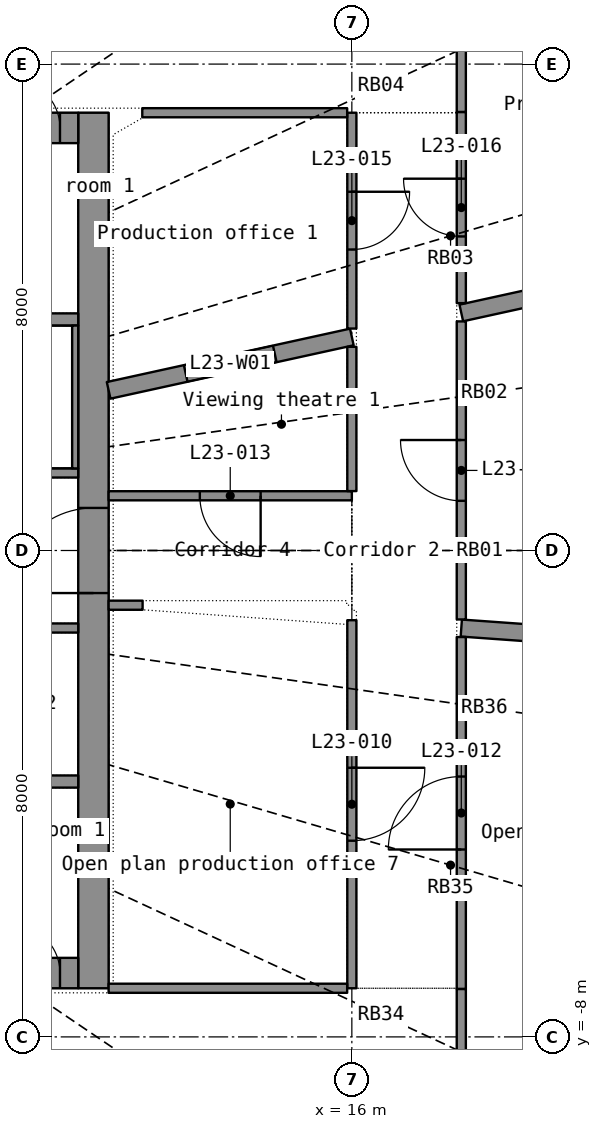
"""IFC4 building model, lengths in metres.
Left out: names, types, materials, properties, quantities, classifications, styles, units other than length and angle.
Written with IfcOpenShell. Run it as: python <this file> out.ifc"""

import sys

from ifc_helpers import new_model, si_unit, direction, frame, frame_2d, origin, place, context, subcontext, project, spatial, rectangle, extrude, element, fill, save


model = new_model("IFC4")
c1 = context("Model", 3, precision=1e-05, world=origin(), true_north=direction((0.0, 1.0)))
c2 = subcontext(c1, "Body", "Model", "MODEL_VIEW")
j1 = project(units=[si_unit("LENGTHUNIT", "METRE"), si_unit("PLANEANGLEUNIT", "RADIAN")], contexts=[c1])
p1 = place(None, origin())
s1 = spatial("IfcSite", under=j1, at=p1, CompositionType="ELEMENT")
p2 = place(p1, origin())
s2 = spatial("IfcBuilding", under=s1, at=p2, CompositionType="ELEMENT")
p3 = place(p2, frame((0.0, 0.0, 100.8)))
s3 = spatial("IfcBuildingStorey", under=s2, at=p3, CompositionType="ELEMENT", Elevation=100.8)
p4 = place(p3, frame((11.75, -7.2, 0.0), z_axis=(0.0, 0.0, 1.0), x_axis=(0.0, 1.0, 0.0)))
e1 = element("IfcWall", 1, at=p4, inside=s3, PredefinedType="SHEAR", context=c2, shape_type="SweptSolid", body=[
    extrude(rectangle(XDim=14.4, YDim=0.5, at=frame_2d((7.2, 0.0))), origin(), (0.0, 0.0, 1.0), 3.3),
])
p5 = place(p4, frame((6.5, 0.0, 0.0)))
e2 = element("IfcOpeningElement", 2, at=p5, cuts=e1, PredefinedType="OPENING", context=c2, shape_type="SweptSolid", body=[
    extrude(rectangle(XDim=1.4, YDim=2.2, at=frame_2d((0.7, 1.1))), frame((0.0, 0.26, 0.0), z_axis=(0.0, -1.0, 0.0), x_axis=(1.0, 0.0, 0.0)), (0.0, 0.0, 1.0), 0.52),
])
p6 = place(p3, frame((-11.5, -6.95, 0.0), z_axis=(0.0, 0.0, 1.0), x_axis=(1.0, 0.0, 0.0)))
e3 = element("IfcWall", 3, at=p6, inside=s3, PredefinedType="SHEAR", context=c2, shape_type="SweptSolid", body=[
    extrude(rectangle(XDim=23.0, YDim=0.5, at=frame_2d((11.5, 0.0))), origin(), (0.0, 0.0, 1.0), 3.3),
])
p7 = place(p6, frame((1.95, 0.0, 0.0)))
e4 = element("IfcOpeningElement", 4, at=p7, cuts=e3, PredefinedType="OPENING", context=c2, shape_type="SweptSolid", body=[
    extrude(rectangle(XDim=1.1, YDim=2.2, at=frame_2d((0.55, 1.1))), frame((0.0, 0.26, 0.0), z_axis=(0.0, -1.0, 0.0), x_axis=(1.0, 0.0, 0.0)), (0.0, 0.0, 1.0), 0.52),
])
p8 = place(p6, frame((3.95, 0.0, 0.0)))
e5 = element("IfcOpeningElement", 5, at=p8, cuts=e3, PredefinedType="OPENING", context=c2, shape_type="SweptSolid", body=[
    extrude(rectangle(XDim=1.1, YDim=2.2, at=frame_2d((0.55, 1.1))), frame((0.0, 0.26, 0.0), z_axis=(0.0, -1.0, 0.0), x_axis=(1.0, 0.0, 0.0)), (0.0, 0.0, 1.0), 0.52),
])
p9 = place(p6, frame((5.95, 0.0, 0.0)))
e6 = element("IfcOpeningElement", 6, at=p9, cuts=e3, PredefinedType="OPENING", context=c2, shape_type="SweptSolid", body=[
    extrude(rectangle(XDim=1.1, YDim=2.2, at=frame_2d((0.55, 1.1))), frame((0.0, 0.26, 0.0), z_axis=(0.0, -1.0, 0.0), x_axis=(1.0, 0.0, 0.0)), (0.0, 0.0, 1.0), 0.52),
])
p10 = place(p6, frame((7.95, 0.0, 0.0)))
e7 = element("IfcOpeningElement", 7, at=p10, cuts=e3, PredefinedType="OPENING", context=c2, shape_type="SweptSolid", body=[
    extrude(rectangle(XDim=1.1, YDim=2.2, at=frame_2d((0.55, 1.1))), frame((0.0, 0.26, 0.0), z_axis=(0.0, -1.0, 0.0), x_axis=(1.0, 0.0, 0.0)), (0.0, 0.0, 1.0), 0.52),
])
p11 = place(p6, frame((9.95, 0.0, 0.0)))
e8 = element("IfcOpeningElement", 8, at=p11, cuts=e3, PredefinedType="OPENING", context=c2, shape_type="SweptSolid", body=[
    extrude(rectangle(XDim=1.1, YDim=2.2, at=frame_2d((0.55, 1.1))), frame((0.0, 0.26, 0.0), z_axis=(0.0, -1.0, 0.0), x_axis=(1.0, 0.0, 0.0)), (0.0, 0.0, 1.0), 0.52),
])
p12 = place(p6, frame((11.95, 0.0, 0.0)))
e9 = element("IfcOpeningElement", 9, at=p12, cuts=e3, PredefinedType="OPENING", context=c2, shape_type="SweptSolid", body=[
    extrude(rectangle(XDim=1.1, YDim=2.2, at=frame_2d((0.55, 1.1))), frame((0.0, 0.26, 0.0), z_axis=(0.0, -1.0, 0.0), x_axis=(1.0, 0.0, 0.0)), (0.0, 0.0, 1.0), 0.52),
])
p13 = place(p6, frame((13.95, 0.0, 0.0)))
e10 = element("IfcOpeningElement", 10, at=p13, cuts=e3, PredefinedType="OPENING", context=c2, shape_type="SweptSolid", body=[
    extrude(rectangle(XDim=1.1, YDim=2.2, at=frame_2d((0.55, 1.1))), frame((0.0, 0.26, 0.0), z_axis=(0.0, -1.0, 0.0), x_axis=(1.0, 0.0, 0.0)), (0.0, 0.0, 1.0), 0.52),
])
p14 = place(p6, frame((15.95, 0.0, 0.0)))
e11 = element("IfcOpeningElement", 11, at=p14, cuts=e3, PredefinedType="OPENING", context=c2, shape_type="SweptSolid", body=[
    extrude(rectangle(XDim=1.1, YDim=2.2, at=frame_2d((0.55, 1.1))), frame((0.0, 0.26, 0.0), z_axis=(0.0, -1.0, 0.0), x_axis=(1.0, 0.0, 0.0)), (0.0, 0.0, 1.0), 0.52),
])
p15 = place(p6, frame((19.95, 0.0, 0.0)))
e12 = element("IfcOpeningElement", 12, at=p15, cuts=e3, PredefinedType="OPENING", context=c2, shape_type="SweptSolid", body=[
    extrude(rectangle(XDim=1.1, YDim=2.2, at=frame_2d((0.55, 1.1))), frame((0.0, 0.26, 0.0), z_axis=(0.0, -1.0, 0.0), x_axis=(1.0, 0.0, 0.0)), (0.0, 0.0, 1.0), 0.52),
])
p16 = place(p6, frame((0.3, 0.0, 0.0)))
e13 = element("IfcOpeningElement", 13, at=p16, cuts=e3, PredefinedType="OPENING", context=c2, shape_type="SweptSolid", body=[
    extrude(rectangle(XDim=0.8, YDim=2.05, at=frame_2d((0.4, 1.025))), frame((0.0, 0.26, 0.0), z_axis=(0.0, -1.0, 0.0), x_axis=(1.0, 0.0, 0.0)), (0.0, 0.0, 1.0), 0.52),
])
p17 = place(p6, frame((21.9, 0.0, 0.0)))
e14 = element("IfcOpeningElement", 14, at=p17, cuts=e3, PredefinedType="OPENING", context=c2, shape_type="SweptSolid", body=[
    extrude(rectangle(XDim=0.8, YDim=2.05, at=frame_2d((0.4, 1.025))), frame((0.0, 0.26, 0.0), z_axis=(0.0, -1.0, 0.0), x_axis=(1.0, 0.0, 0.0)), (0.0, 0.0, 1.0), 0.52),
])
p18 = place(p3, frame((-11.5, 6.95, 0.0), z_axis=(0.0, 0.0, 1.0), x_axis=(1.0, 0.0, 0.0)))
e15 = element("IfcWall", 15, at=p18, inside=s3, PredefinedType="SHEAR", context=c2, shape_type="SweptSolid", body=[
    extrude(rectangle(XDim=23.0, YDim=0.5, at=frame_2d((11.5, 0.0))), origin(), (0.0, 0.0, 1.0), 3.3),
])
p19 = place(p18, frame((1.95, 0.0, 0.0)))
e16 = element("IfcOpeningElement", 16, at=p19, cuts=e15, PredefinedType="OPENING", context=c2, shape_type="SweptSolid", body=[
    extrude(rectangle(XDim=1.1, YDim=2.2, at=frame_2d((0.55, 1.1))), frame((0.0, 0.26, 0.0), z_axis=(0.0, -1.0, 0.0), x_axis=(1.0, 0.0, 0.0)), (0.0, 0.0, 1.0), 0.52),
])
p20 = place(p18, frame((8.05, 0.0, 0.0)))
e17 = element("IfcOpeningElement", 17, at=p20, cuts=e15, PredefinedType="OPENING", context=c2, shape_type="SweptSolid", body=[
    extrude(rectangle(XDim=0.9, YDim=2.1, at=frame_2d((0.45, 1.05))), frame((0.0, 0.26, 0.0), z_axis=(0.0, -1.0, 0.0), x_axis=(1.0, 0.0, 0.0)), (0.0, 0.0, 1.0), 0.52),
])
p21 = place(p18, frame((16.05, 0.0, 0.0)))
e18 = element("IfcOpeningElement", 18, at=p21, cuts=e15, PredefinedType="OPENING", context=c2, shape_type="SweptSolid", body=[
    extrude(rectangle(XDim=0.9, YDim=2.1, at=frame_2d((0.45, 1.05))), frame((0.0, 0.26, 0.0), z_axis=(0.0, -1.0, 0.0), x_axis=(1.0, 0.0, 0.0)), (0.0, 0.0, 1.0), 0.52),
])
p22 = place(p18, frame((0.3, 0.0, 0.0)))
e19 = element("IfcOpeningElement", 19, at=p22, cuts=e15, PredefinedType="OPENING", context=c2, shape_type="SweptSolid", body=[
    extrude(rectangle(XDim=0.8, YDim=2.05, at=frame_2d((0.4, 1.025))), frame((0.0, 0.26, 0.0), z_axis=(0.0, -1.0, 0.0), x_axis=(1.0, 0.0, 0.0)), (0.0, 0.0, 1.0), 0.52),
])
p23 = place(p18, frame((21.9, 0.0, 0.0)))
e20 = element("IfcOpeningElement", 20, at=p23, cuts=e15, PredefinedType="OPENING", context=c2, shape_type="SweptSolid", body=[
    extrude(rectangle(XDim=0.8, YDim=2.05, at=frame_2d((0.4, 1.025))), frame((0.0, 0.26, 0.0), z_axis=(0.0, -1.0, 0.0), x_axis=(1.0, 0.0, 0.0)), (0.0, 0.0, 1.0), 0.52),
])
for number, where, z_axis, x_axis in (
    (21, (-11.5, -3.8, 0.0), (0.0, 0.0, 1.0), (1.0, 0.0, 0.0)),
    (22, (-11.5, 3.8, 0.0), (0.0, 0.0, 1.0), (1.0, 0.0, 0.0)),
):
    element("IfcWall", number, at=place(p3, frame(where, z_axis=z_axis, x_axis=x_axis)), inside=s3, PredefinedType="SHEAR", context=c2, shape_type="SweptSolid", body=[
        extrude(rectangle(XDim=23.0, YDim=0.2, at=frame_2d((11.5, 0.0))), origin(), (0.0, 0.0, 1.0), 3.3),
    ])
p24 = place(p3, frame((3.0, -1.275, 0.0), z_axis=(0.0, 0.0, 1.0), x_axis=(1.0, 0.0, 0.0)))
e23 = element("IfcWall", 23, at=p24, inside=s3, PredefinedType="PARTITIONING", context=c2, shape_type="SweptSolid", body=[
    extrude(rectangle(XDim=8.5, YDim=0.15, at=frame_2d((4.25, 0.0))), origin(), (0.0, 0.0, 1.0), 3.3),
])
p25 = place(p24, frame((0.805, 0.0, 0.0)))
e24 = element("IfcOpeningElement", 24, at=p25, cuts=e23, PredefinedType="OPENING", context=c2, shape_type="SweptSolid", body=[
    extrude(rectangle(XDim=0.85, YDim=2.1, at=frame_2d((0.425, 1.05))), frame((0.0, 0.085, 0.0), z_axis=(0.0, -1.0, 0.0), x_axis=(1.0, 0.0, 0.0)), (0.0, 0.0, 1.0), 0.17),
])
p26 = place(p24, frame((3.062, 0.0, 0.0)))
e25 = element("IfcOpeningElement", 25, at=p26, cuts=e23, PredefinedType="OPENING", context=c2, shape_type="SweptSolid", body=[
    extrude(rectangle(XDim=0.9, YDim=2.1, at=frame_2d((0.45, 1.05))), frame((0.0, 0.085, 0.0), z_axis=(0.0, -1.0, 0.0), x_axis=(1.0, 0.0, 0.0)), (0.0, 0.0, 1.0), 0.17),
])
p27 = place(p24, frame((6.082, 0.0, 0.0)))
e26 = element("IfcOpeningElement", 26, at=p27, cuts=e23, PredefinedType="OPENING", context=c2, shape_type="SweptSolid", body=[
    extrude(rectangle(XDim=0.9, YDim=2.1, at=frame_2d((0.45, 1.05))), frame((0.0, 0.085, 0.0), z_axis=(0.0, -1.0, 0.0), x_axis=(1.0, 0.0, 0.0)), (0.0, 0.0, 1.0), 0.17),
])
p28 = place(p3, frame((3.0, 1.275, 0.0), z_axis=(0.0, 0.0, 1.0), x_axis=(1.0, 0.0, 0.0)))
e27 = element("IfcWall", 27, at=p28, inside=s3, PredefinedType="SHEAR", context=c2, shape_type="SweptSolid", body=[
    extrude(rectangle(XDim=8.5, YDim=0.15, at=frame_2d((4.25, 0.0))), origin(), (0.0, 0.0, 1.0), 3.3),
])
p29 = place(p28, frame((2.05, 0.0, 0.0)))
e28 = element("IfcOpeningElement", 28, at=p29, cuts=e27, PredefinedType="OPENING", context=c2, shape_type="SweptSolid", body=[
    extrude(rectangle(XDim=1.1, YDim=2.15, at=frame_2d((0.55, 1.075))), frame((0.0, 0.085, 0.0), z_axis=(0.0, -1.0, 0.0), x_axis=(1.0, 0.0, 0.0)), (0.0, 0.0, 1.0), 0.17),
])
p30 = place(p28, frame((0.45, 0.0, 0.0)))
e29 = element("IfcOpeningElement", 29, at=p30, cuts=e27, PredefinedType="OPENING", context=c2, shape_type="SweptSolid", body=[
    extrude(rectangle(XDim=0.9, YDim=2.1, at=frame_2d((0.45, 1.05))), frame((0.0, 0.085, 0.0), z_axis=(0.0, -1.0, 0.0), x_axis=(1.0, 0.0, 0.0)), (0.0, 0.0, 1.0), 0.17),
])
p31 = place(p3, frame((11.45, 1.35, 0.0), z_axis=(0.0, 0.0, 1.0), x_axis=(0.0, 1.0, 0.0)))
e30 = element("IfcWall", 30, at=p31, inside=s3, PredefinedType="SHEAR", context=c2, shape_type="SweptSolid", body=[
    extrude(rectangle(XDim=2.35, YDim=0.1, at=frame_2d((1.175, 0.0))), origin(), (0.0, 0.0, 1.0), 3.3),
])
p32 = place(p3, frame((25.771, -1.847, 0.0), z_axis=(0.0, 0.0, 1.0), x_axis=(-0.997443635, 0.071457645, 0.0)))
e31 = element("IfcWall", 31, at=p32, inside=s3, PredefinedType="PARTITIONING", context=c2, shape_type="SweptSolid", body=[
    extrude(rectangle(XDim=7.991, YDim=0.28, at=frame_2d((3.996, 0.0))), origin(), (0.0, 0.0, 1.0), 2.4),
])
p33 = place(p32, frame((3.246, 0.0, 1.0)))
e32 = element("IfcOpeningElement", 32, at=p33, cuts=e31, PredefinedType="OPENING", context=c2, shape_type="SweptSolid", body=[
    extrude(rectangle(XDim=1.5, YDim=1.2, at=frame_2d((0.75, 0.6))), frame((0.0, 0.15, 0.0), z_axis=(0.0, -1.0, 0.0), x_axis=(1.0, 0.0, 0.0)), (0.0, 0.0, 1.0), 0.3),
])
p34 = place(p3, frame((24.986, 5.484, 0.0), z_axis=(0.0, 0.0, 1.0), x_axis=(-0.976749089, -0.214385673, 0.0)))
e33 = element("IfcWall", 33, at=p34, inside=s3, PredefinedType="PARTITIONING", context=c2, shape_type="SweptSolid", body=[
    extrude(rectangle(XDim=7.357, YDim=0.28, at=frame_2d((3.678, 0.0))), origin(), (0.0, 0.0, 1.0), 2.4),
])
p35 = place(p3, frame((16.0, -1.146, 0.0), z_axis=(0.0, 0.0, 1.0), x_axis=(0.0, -1.0, 0.0)))
e34 = element("IfcWall", 34, at=p35, inside=s3, PredefinedType="PARTITIONING", context=c2, shape_type="SweptSolid", body=[
    extrude(rectangle(XDim=6.053, YDim=0.15, at=frame_2d((3.027, 0.0))), origin(), (0.0, 0.0, 1.0), 2.4),
])
p36 = place(p35, frame((2.427, 0.0, 0.0)))
e35 = element("IfcOpeningElement", 35, at=p36, cuts=e34, PredefinedType="OPENING", context=c2, shape_type="SweptSolid", body=[
    extrude(rectangle(XDim=1.2, YDim=2.2, at=frame_2d((0.6, 1.1))), frame((0.0, 0.085, 0.0), z_axis=(0.0, -1.0, 0.0), x_axis=(1.0, 0.0, 0.0)), (0.0, 0.0, 1.0), 0.17),
])
p37 = place(p3, frame((17.8, -7.212, 0.0), z_axis=(0.0, 0.0, 1.0), x_axis=(0.0, 1.0, 0.0)))
e36 = element("IfcWall", 36, at=p37, inside=s3, PredefinedType="PARTITIONING", context=c2, shape_type="SweptSolid", body=[
    extrude(rectangle(XDim=5.789, YDim=0.15, at=frame_2d((2.894, 0.0))), origin(), (0.0, 0.0, 1.0), 2.4),
])
p38 = place(p37, frame((2.294, 0.0, 0.0)))
e37 = element("IfcOpeningElement", 37, at=p38, cuts=e36, PredefinedType="OPENING", context=c2, shape_type="SweptSolid", body=[
    extrude(rectangle(XDim=1.2, YDim=2.2, at=frame_2d((0.6, 1.1))), frame((0.0, 0.085, 0.0), z_axis=(0.0, -1.0, 0.0), x_axis=(1.0, 0.0, 0.0)), (0.0, 0.0, 1.0), 0.17),
])
p39 = place(p3, frame((17.8, -1.134, 0.0), z_axis=(0.0, 0.0, 1.0), x_axis=(0.0, 1.0, 0.0)))
e38 = element("IfcWall", 38, at=p39, inside=s3, PredefinedType="PARTITIONING", context=c2, shape_type="SweptSolid", body=[
    extrude(rectangle(XDim=4.902, YDim=0.15, at=frame_2d((2.451, 0.0))), origin(), (0.0, 0.0, 1.0), 2.4),
])
p40 = place(p39, frame((1.951, 0.0, 0.0)))
e39 = element("IfcOpeningElement", 39, at=p40, cuts=e38, PredefinedType="OPENING", context=c2, shape_type="SweptSolid", body=[
    extrude(rectangle(XDim=1.0, YDim=2.2, at=frame_2d((0.5, 1.1))), frame((0.0, 0.085, 0.0), z_axis=(0.0, -1.0, 0.0), x_axis=(1.0, 0.0, 0.0)), (0.0, 0.0, 1.0), 0.17),
])
p41 = place(p3, frame((16.0, 3.512, 0.0), z_axis=(0.0, 0.0, 1.0), x_axis=(-0.976750433, -0.214379551, 0.0)))
e40 = element("IfcWall", 40, at=p41, inside=s3, PredefinedType="PARTITIONING", context=c2, shape_type="SweptSolid", body=[
    extrude(rectangle(XDim=4.095, YDim=0.28, at=frame_2d((2.048, 0.0))), origin(), (0.0, 0.0, 1.0), 2.4),
])
p42 = place(p41, frame((1.298, 0.0, 1.0)))
e41 = element("IfcOpeningElement", 41, at=p42, cuts=e40, PredefinedType="OPENING", context=c2, shape_type="SweptSolid", body=[
    extrude(rectangle(XDim=1.5, YDim=1.2, at=frame_2d((0.75, 0.6))), frame((0.0, 0.15, 0.0), z_axis=(0.0, -1.0, 0.0), x_axis=(1.0, 0.0, 0.0)), (0.0, 0.0, 1.0), 0.3),
])
p43 = place(p3, frame((15.923, -7.2, 0.0), z_axis=(0.0, 0.0, 1.0), x_axis=(-1.0, 0.0, 0.0)))
e42 = element("IfcWall", 42, at=p43, inside=s3, PredefinedType="PARTITIONING", context=c2, shape_type="SweptSolid", body=[
    extrude(rectangle(XDim=3.923, YDim=0.15, at=frame_2d((1.961, 0.0))), origin(), (0.0, 0.0, 1.0), 2.4),
])
p44 = place(p3, frame((16.0, 0.9, 0.0), z_axis=(0.0, 0.0, 1.0), x_axis=(-1.0, 0.0, 0.0)))
e43 = element("IfcWall", 43, at=p44, inside=s3, PredefinedType="PARTITIONING", context=c2, shape_type="SweptSolid", body=[
    extrude(rectangle(XDim=4.0, YDim=0.15, at=frame_2d((2.0, 0.0))), origin(), (0.0, 0.0, 1.0), 2.4),
])
p45 = place(p44, frame((1.5, 0.0, 0.0)))
e44 = element("IfcOpeningElement", 44, at=p45, cuts=e43, PredefinedType="OPENING", context=c2, shape_type="SweptSolid", body=[
    extrude(rectangle(XDim=1.0, YDim=2.2, at=frame_2d((0.5, 1.1))), frame((0.0, 0.085, 0.0), z_axis=(0.0, -1.0, 0.0), x_axis=(1.0, 0.0, 0.0)), (0.0, 0.0, 1.0), 0.17),
])
p46 = place(p3, frame((16.0, 7.2, 0.0), z_axis=(0.0, 0.0, 1.0), x_axis=(0.0, -1.0, 0.0)))
e45 = element("IfcWall", 45, at=p46, inside=s3, PredefinedType="PARTITIONING", context=c2, shape_type="SweptSolid", body=[
    extrude(rectangle(XDim=3.55, YDim=0.15, at=frame_2d((1.775, 0.0))), origin(), (0.0, 0.0, 1.0), 2.4),
])
p47 = place(p46, frame((1.3, 0.0, 0.0)))
e46 = element("IfcOpeningElement", 46, at=p47, cuts=e45, PredefinedType="OPENING", context=c2, shape_type="SweptSolid", body=[
    extrude(rectangle(XDim=0.95, YDim=2.15, at=frame_2d((0.475, 1.075))), frame((0.0, 0.085, 0.0), z_axis=(0.0, -1.0, 0.0), x_axis=(1.0, 0.0, 0.0)), (0.0, 0.0, 1.0), 0.17),
])
p48 = place(p3, frame((12.553, 7.2, 0.0), z_axis=(0.0, 0.0, 1.0), x_axis=(1.0, 0.0, 0.0)))
e47 = element("IfcWall", 47, at=p48, inside=s3, PredefinedType="PARTITIONING", context=c2, shape_type="SweptSolid", body=[
    extrude(rectangle(XDim=3.37, YDim=0.15, at=frame_2d((1.685, 0.0))), origin(), (0.0, 0.0, 1.0), 2.4),
])
p49 = place(p3, frame((17.8, 4.069, 0.0), z_axis=(0.0, 0.0, 1.0), x_axis=(0.0, 1.0, 0.0)))
e48 = element("IfcWall", 48, at=p49, inside=s3, PredefinedType="PARTITIONING", context=c2, shape_type="SweptSolid", body=[
    extrude(rectangle(XDim=3.143, YDim=0.15, at=frame_2d((1.572, 0.0))), origin(), (0.0, 0.0, 1.0), 2.4),
])
p50 = place(p49, frame((1.097, 0.0, 0.0)))
e49 = element("IfcOpeningElement", 49, at=p50, cuts=e48, PredefinedType="OPENING", context=c2, shape_type="SweptSolid", body=[
    extrude(rectangle(XDim=0.95, YDim=2.15, at=frame_2d((0.475, 1.075))), frame((0.0, 0.085, 0.0), z_axis=(0.0, -1.0, 0.0), x_axis=(1.0, 0.0, 0.0)), (0.0, 0.0, 1.0), 0.17),
])
for number, where, z_axis, x_axis in (
    (50, (17.8, 7.213, 0.0), (0.0, 0.0, 1.0), (0.0, 1.0, 0.0)),
    (51, (17.8, -10.123, 0.0), (0.0, 0.0, 1.0), (0.0, 1.0, 0.0)),
):
    element("IfcWall", number, at=place(p3, frame(where, z_axis=z_axis, x_axis=x_axis)), inside=s3, PredefinedType="PARTITIONING", context=c2, shape_type="SweptSolid", body=[
        extrude(rectangle(XDim=2.91, YDim=0.15, at=frame_2d((1.455, 0.0))), origin(), (0.0, 0.0, 1.0), 2.4),
    ])
p51 = place(p3, frame((16.0, 3.35, 0.0), z_axis=(0.0, 0.0, 1.0), x_axis=(0.0, -1.0, 0.0)))
e52 = element("IfcWall", 52, at=p51, inside=s3, PredefinedType="PARTITIONING", context=c2, shape_type="SweptSolid", body=[
    extrude(rectangle(XDim=2.373, YDim=0.15, at=frame_2d((1.187, 0.0))), origin(), (0.0, 0.0, 1.0), 2.4),
])
p52 = place(p3, frame((12.0, -0.9, 0.0), z_axis=(0.0, 0.0, 1.0), x_axis=(1.0, 0.0, 0.0)))
e53 = element("IfcWall", 53, at=p52, inside=s3, PredefinedType="PARTITIONING", context=c2, shape_type="SweptSolid", body=[
    extrude(rectangle(XDim=0.559, YDim=0.15, at=frame_2d((0.279, 0.0))), origin(), (0.0, 0.0, 1.0), 2.4),
])
p53 = place(p17, origin())
e54 = element("IfcDoor", 54, at=p53, inside=s3, OperationType="SINGLE_SWING_LEFT", PredefinedType="DOOR", context=c2, shape_type="SweptSolid", body=[
    extrude(rectangle(XDim=0.8, YDim=2.05, at=frame_2d((0.4, 1.025))), frame((0.0, 0.025, 0.0), z_axis=(0.0, -1.0, 0.0), x_axis=(1.0, 0.0, 0.0)), (0.0, 0.0, 1.0), 0.05),
])
fill(e14, e54)
p54 = place(p23, origin())
e55 = element("IfcDoor", 55, at=p54, inside=s3, OperationType="SINGLE_SWING_LEFT", PredefinedType="DOOR", context=c2, shape_type="SweptSolid", body=[
    extrude(rectangle(XDim=0.8, YDim=2.05, at=frame_2d((0.4, 1.025))), frame((0.0, 0.025, 0.0), z_axis=(0.0, -1.0, 0.0), x_axis=(1.0, 0.0, 0.0)), (0.0, 0.0, 1.0), 0.05),
])
fill(e20, e55)
p55 = place(p5, origin())
e56 = element("IfcDoor", 56, at=p55, inside=s3, OperationType="DOUBLE_DOOR_SINGLE_SWING", PredefinedType="DOOR", context=c2, shape_type="SweptSolid", body=[
    extrude(rectangle(XDim=1.4, YDim=2.2, at=frame_2d((0.7, 1.1))), frame((0.0, 0.025, 0.0), z_axis=(0.0, -1.0, 0.0), x_axis=(1.0, 0.0, 0.0)), (0.0, 0.0, 1.0), 0.05),
])
fill(e2, e56)
p56 = place(p36, origin())
e57 = element("IfcDoor", 57, at=p56, inside=s3, OperationType="DOUBLE_DOOR_SINGLE_SWING", PredefinedType="DOOR", context=c2, shape_type="SweptSolid", body=[
    extrude(rectangle(XDim=1.2, YDim=2.2, at=frame_2d((0.6, 1.1))), frame((0.0, 0.025, 0.0), z_axis=(0.0, -1.0, 0.0), x_axis=(1.0, 0.0, 0.0)), (0.0, 0.0, 1.0), 0.05),
])
fill(e35, e57)
p57 = place(p38, origin())
e58 = element("IfcDoor", 58, at=p57, inside=s3, OperationType="DOUBLE_DOOR_SINGLE_SWING", PredefinedType="DOOR", context=c2, shape_type="SweptSolid", body=[
    extrude(rectangle(XDim=1.2, YDim=2.2, at=frame_2d((0.6, 1.1))), frame((0.0, 0.025, 0.0), z_axis=(0.0, -1.0, 0.0), x_axis=(1.0, 0.0, 0.0)), (0.0, 0.0, 1.0), 0.05),
])
fill(e37, e58)
p58 = place(p45, origin())
e59 = element("IfcDoor", 59, at=p58, inside=s3, OperationType="SINGLE_SWING_LEFT", PredefinedType="DOOR", context=c2, shape_type="SweptSolid", body=[
    extrude(rectangle(XDim=1.0, YDim=2.2, at=frame_2d((0.5, 1.1))), frame((0.0, 0.025, 0.0), z_axis=(0.0, -1.0, 0.0), x_axis=(1.0, 0.0, 0.0)), (0.0, 0.0, 1.0), 0.05),
])
fill(e44, e59)
p59 = place(p40, origin())
e60 = element("IfcDoor", 60, at=p59, inside=s3, OperationType="SINGLE_SWING_RIGHT", PredefinedType="DOOR", context=c2, shape_type="SweptSolid", body=[
    extrude(rectangle(XDim=1.0, YDim=2.2, at=frame_2d((0.5, 1.1))), frame((0.0, 0.025, 0.0), z_axis=(0.0, -1.0, 0.0), x_axis=(1.0, 0.0, 0.0)), (0.0, 0.0, 1.0), 0.05),
])
fill(e39, e60)
p60 = place(p47, origin())
e61 = element("IfcDoor", 61, at=p60, inside=s3, OperationType="SINGLE_SWING_LEFT", PredefinedType="DOOR", context=c2, shape_type="SweptSolid", body=[
    extrude(rectangle(XDim=0.95, YDim=2.15, at=frame_2d((0.475, 1.075))), frame((0.0, 0.025, 0.0), z_axis=(0.0, -1.0, 0.0), x_axis=(1.0, 0.0, 0.0)), (0.0, 0.0, 1.0), 0.05),
])
fill(e46, e61)
p61 = place(p50, origin())
e62 = element("IfcDoor", 62, at=p61, inside=s3, OperationType="SINGLE_SWING_RIGHT", PredefinedType="DOOR", context=c2, shape_type="SweptSolid", body=[
    extrude(rectangle(XDim=0.95, YDim=2.15, at=frame_2d((0.475, 1.075))), frame((0.0, 0.025, 0.0), z_axis=(0.0, -1.0, 0.0), x_axis=(1.0, 0.0, 0.0)), (0.0, 0.0, 1.0), 0.05),
])
fill(e49, e62)
p62 = place(p42, origin())
e63 = element("IfcWindow", 63, at=p62, inside=s3, PartitioningType="SINGLE_PANEL", PredefinedType="WINDOW", context=c2, shape_type="SweptSolid", body=[
    extrude(rectangle(XDim=1.5, YDim=1.2, at=frame_2d((0.75, 0.6))), frame((0.0, 0.03, 0.0), z_axis=(0.0, -1.0, 0.0), x_axis=(1.0, 0.0, 0.0)), (0.0, 0.0, 1.0), 0.06),
])
fill(e41, e63)
save(model, sys.argv[1])
